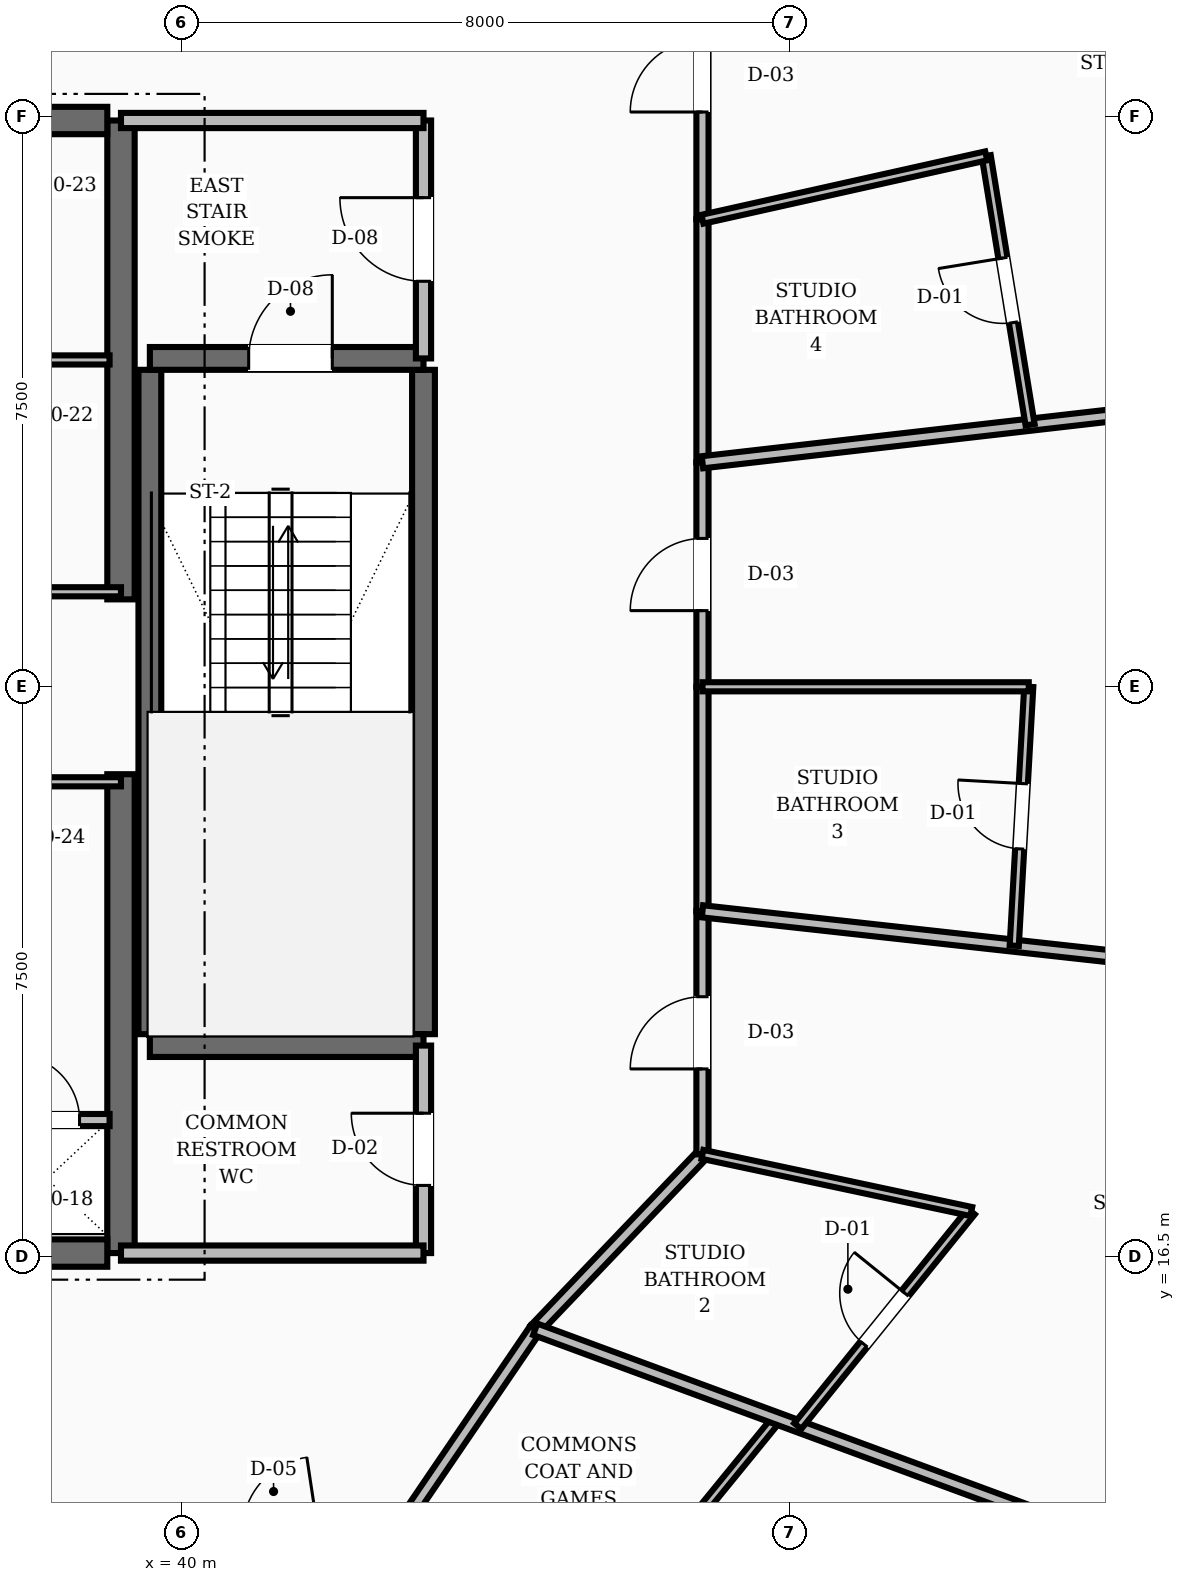
"""IFC4 building model, lengths in metres.
Left out: names, types, materials, properties, quantities, classifications, styles, units other than length and angle.
Written with IfcOpenShell. Run it as: python <this file> out.ifc"""

import sys

from ifc_helpers import new_model, si_unit, direction, frame, frame_2d, origin, place, context, subcontext, project, spatial, rectangle, extrude, element, fill, save


model = new_model("IFC4")
c1 = context("Model", 3, precision=1e-05, world=origin(), true_north=direction((0.0, 1.0)))
c2 = subcontext(c1, "Body", "Model", "MODEL_VIEW")
j1 = project(units=[si_unit("LENGTHUNIT", "METRE"), si_unit("PLANEANGLEUNIT", "RADIAN")], contexts=[c1])
p1 = place(None, origin())
s1 = spatial("IfcSite", under=j1, at=p1, CompositionType="ELEMENT")
p2 = place(p1, origin())
s2 = spatial("IfcBuilding", under=s1, at=p2, CompositionType="ELEMENT")
p3 = place(p2, frame((0.0, 0.0, 120.8)))
s3 = spatial("IfcBuildingStorey", under=s2, at=p3, CompositionType="ELEMENT", Elevation=120.8)
for number, where, z_axis, x_axis in (
    (1, (39.2, 16.55, 0.0), (0.0, 0.0, 1.0), (0.0, 1.0, 0.0)),
    (2, (39.2, 25.15, 0.0), (0.0, 0.0, 1.0), (0.0, 1.0, 0.0)),
):
    element("IfcWall", number, at=place(p3, frame(where, z_axis=z_axis, x_axis=x_axis)), inside=s3, PredefinedType="SHEAR", context=c2, shape_type="SweptSolid", body=[
        extrude(rectangle(XDim=6.3, YDim=0.36, at=frame_2d((3.15, 0.0))), origin(), (0.0, 0.0, 1.0), 3.6),
    ])
p4 = place(p3, frame((35.8, 16.55, 0.0), z_axis=(0.0, 0.0, 1.0), x_axis=(1.0, 0.0, 0.0)))
e3 = element("IfcWall", 3, at=p4, inside=s3, PredefinedType="SHEAR", context=c2, shape_type="SweptSolid", body=[
    extrude(rectangle(XDim=3.22, YDim=0.36, at=frame_2d((1.61, 0.0))), origin(), (0.0, 0.0, 1.0), 3.6),
])
p5 = place(p4, frame((0.3, 0.0, 0.0)))
e4 = element("IfcOpeningElement", 4, at=p5, cuts=e3, PredefinedType="OPENING", context=c2, shape_type="SweptSolid", body=[
    extrude(rectangle(XDim=1.1, YDim=2.1, at=frame_2d((0.55, 1.05))), frame((0.0, 0.19, 0.0), z_axis=(0.0, -1.0, 0.0), x_axis=(1.0, 0.0, 0.0)), (0.0, 0.0, 1.0), 0.38),
])
p6 = place(p3, frame((35.8, 31.45, 0.0), z_axis=(0.0, 0.0, 1.0), x_axis=(1.0, 0.0, 0.0)))
e5 = element("IfcWall", 5, at=p6, inside=s3, PredefinedType="SHEAR", context=c2, shape_type="SweptSolid", body=[
    extrude(rectangle(XDim=3.22, YDim=0.36, at=frame_2d((1.61, 0.0))), origin(), (0.0, 0.0, 1.0), 3.6),
])
p7 = place(p6, frame((0.3, 0.0, 0.0)))
e6 = element("IfcOpeningElement", 6, at=p7, cuts=e5, PredefinedType="OPENING", context=c2, shape_type="SweptSolid", body=[
    extrude(rectangle(XDim=1.1, YDim=2.1, at=frame_2d((0.55, 1.05))), frame((0.0, 0.19, 0.0), z_axis=(0.0, -1.0, 0.0), x_axis=(1.0, 0.0, 0.0)), (0.0, 0.0, 1.0), 0.38),
])
for number, where, z_axis, x_axis in (
    (7, (43.18, 19.43, 0.0), (0.0, 0.0, 1.0), (0.0, 1.0, 0.0)),
    (8, (39.58, 19.43, 0.0), (0.0, 0.0, 1.0), (0.0, 1.0, 0.0)),
):
    element("IfcWall", number, at=place(p3, frame(where, z_axis=z_axis, x_axis=x_axis)), inside=s3, PredefinedType="SHEAR", context=c2, shape_type="SweptSolid", body=[
        extrude(rectangle(XDim=8.74, YDim=0.3, at=frame_2d((4.37, 0.0))), origin(), (0.0, 0.0, 1.0), 3.6),
    ])
p8 = place(p3, frame((39.58, 19.28, 0.0), z_axis=(0.0, 0.0, 1.0), x_axis=(1.0, 0.0, 0.0)))
e9 = element("IfcWall", 9, at=p8, inside=s3, PredefinedType="SHEAR", context=c2, shape_type="SweptSolid", body=[
    extrude(rectangle(XDim=3.6, YDim=0.3, at=frame_2d((1.8, 0.0))), origin(), (0.0, 0.0, 1.0), 3.6),
])
p9 = place(p3, frame((39.58, 28.32, 0.0), z_axis=(0.0, 0.0, 1.0), x_axis=(1.0, 0.0, 0.0)))
e10 = element("IfcWall", 10, at=p9, inside=s3, PredefinedType="SHEAR", context=c2, shape_type="SweptSolid", body=[
    extrude(rectangle(XDim=3.6, YDim=0.3, at=frame_2d((1.8, 0.0))), origin(), (0.0, 0.0, 1.0), 3.6),
])
p10 = place(p9, frame((1.3, 0.0, 0.0)))
e11 = element("IfcOpeningElement", 11, at=p10, cuts=e10, PredefinedType="OPENING", context=c2, shape_type="SweptSolid", body=[
    extrude(rectangle(XDim=1.1, YDim=2.1, at=frame_2d((0.55, 1.05))), frame((0.0, 0.16, 0.0), z_axis=(0.0, -1.0, 0.0), x_axis=(1.0, 0.0, 0.0)), (0.0, 0.0, 1.0), 0.32),
])
p11 = place(p3, frame((43.18, 28.32, 0.0), z_axis=(0.0, 0.0, 1.0), x_axis=(0.0, 1.0, 0.0)))
e12 = element("IfcWall", 12, at=p11, inside=s3, PredefinedType="SOLIDWALL", context=c2, shape_type="SweptSolid", body=[
    extrude(rectangle(XDim=3.13, YDim=0.2, at=frame_2d((1.565, 0.0))), origin(), (0.0, 0.0, 1.0), 2.8),
])
p12 = place(p11, frame((1.015, 0.0, 0.0)))
e13 = element("IfcOpeningElement", 13, at=p12, cuts=e12, PredefinedType="OPENING", context=c2, shape_type="SweptSolid", body=[
    extrude(rectangle(XDim=1.1, YDim=2.1, at=frame_2d((0.55, 1.05))), frame((0.0, 0.11, 0.0), z_axis=(0.0, -1.0, 0.0), x_axis=(1.0, 0.0, 0.0)), (0.0, 0.0, 1.0), 0.22),
])
p13 = place(p3, frame((39.2, 31.45, 0.0), z_axis=(0.0, 0.0, 1.0), x_axis=(1.0, 0.0, 0.0)))
e14 = element("IfcWall", 14, at=p13, inside=s3, PredefinedType="SOLIDWALL", context=c2, shape_type="SweptSolid", body=[
    extrude(rectangle(XDim=3.98, YDim=0.2, at=frame_2d((1.99, 0.0))), origin(), (0.0, 0.0, 1.0), 2.8),
])
p14 = place(p3, frame((43.18, 16.55, 0.0), z_axis=(0.0, 0.0, 1.0), x_axis=(0.0, 1.0, 0.0)))
e15 = element("IfcWall", 15, at=p14, inside=s3, PredefinedType="SOLIDWALL", context=c2, shape_type="SweptSolid", body=[
    extrude(rectangle(XDim=2.73, YDim=0.2, at=frame_2d((1.365, 0.0))), origin(), (0.0, 0.0, 1.0), 2.8),
])
p15 = place(p14, frame((0.89, 0.0, 0.0)))
e16 = element("IfcOpeningElement", 16, at=p15, cuts=e15, PredefinedType="OPENING", context=c2, shape_type="SweptSolid", body=[
    extrude(rectangle(XDim=0.95, YDim=2.1, at=frame_2d((0.475, 1.05))), frame((0.0, 0.11, 0.0), z_axis=(0.0, -1.0, 0.0), x_axis=(1.0, 0.0, 0.0)), (0.0, 0.0, 1.0), 0.22),
])
p16 = place(p3, frame((39.2, 16.55, 0.0), z_axis=(0.0, 0.0, 1.0), x_axis=(1.0, 0.0, 0.0)))
e17 = element("IfcWall", 17, at=p16, inside=s3, PredefinedType="SOLIDWALL", context=c2, shape_type="SweptSolid", body=[
    extrude(rectangle(XDim=3.98, YDim=0.2, at=frame_2d((1.99, 0.0))), origin(), (0.0, 0.0, 1.0), 2.8),
])
p17 = place(p3, frame((37.4, 18.3, 0.0), z_axis=(0.0, 0.0, 1.0), x_axis=(1.0, 0.0, 0.0)))
e18 = element("IfcWall", 18, at=p17, inside=s3, PredefinedType="SOLIDWALL", context=c2, shape_type="SweptSolid", body=[
    extrude(rectangle(XDim=1.65, YDim=0.16, at=frame_2d((0.825, 0.0))), origin(), (0.0, 0.0, 1.0), 2.8),
])
p18 = place(p17, frame((0.395, 0.0, 0.0)))
e19 = element("IfcOpeningElement", 19, at=p18, cuts=e18, PredefinedType="OPENING", context=c2, shape_type="SweptSolid", body=[
    extrude(rectangle(XDim=0.86, YDim=2.1, at=frame_2d((0.43, 1.05))), frame((0.0, 0.09, 0.0), z_axis=(0.0, -1.0, 0.0), x_axis=(1.0, 0.0, 0.0)), (0.0, 0.0, 1.0), 0.18),
])
for number, where, z_axis, x_axis in (
    (20, (37.4, 25.25, 0.0), (0.0, 0.0, 1.0), (1.0, 0.0, 0.0)),
    (21, (37.4, 22.75, 0.0), (0.0, 0.0, 1.0), (1.0, 0.0, 0.0)),
):
    element("IfcWall", number, at=place(p3, frame(where, z_axis=z_axis, x_axis=x_axis)), inside=s3, PredefinedType="PARTITIONING", context=c2, shape_type="SweptSolid", body=[
        extrude(rectangle(XDim=1.8, YDim=0.12, at=frame_2d((0.9, 0.0))), origin(), (0.0, 0.0, 1.0), 2.8),
    ])
p19 = place(p3, frame((37.4, 28.3, 0.0), z_axis=(0.0, 0.0, 1.0), x_axis=(1.0, 0.0, 0.0)))
e22 = element("IfcWall", 22, at=p19, inside=s3, PredefinedType="PARTITIONING", context=c2, shape_type="SweptSolid", body=[
    extrude(rectangle(XDim=1.65, YDim=0.12, at=frame_2d((0.825, 0.0))), origin(), (0.0, 0.0, 1.0), 2.8),
])
p20 = place(p3, frame((46.85, 24.0, 0.0), z_axis=(0.0, 0.0, 1.0), x_axis=(0.0, 1.0, 0.0)))
e23 = element("IfcWall", 23, at=p20, inside=s3, PredefinedType="SOLIDWALL", context=c2, shape_type="SweptSolid", body=[
    extrude(rectangle(XDim=2.954, YDim=0.16, at=frame_2d((1.477, 0.0))), origin(), (0.0, 0.0, 1.0), 2.8),
])
p21 = place(p20, frame((1.002, 0.0, 0.0)))
e24 = element("IfcOpeningElement", 24, at=p21, cuts=e23, PredefinedType="OPENING", context=c2, shape_type="SweptSolid", body=[
    extrude(rectangle(XDim=0.95, YDim=2.1, at=frame_2d((0.475, 1.05))), frame((0.0, 0.09, 0.0), z_axis=(0.0, -1.0, 0.0), x_axis=(1.0, 0.0, 0.0)), (0.0, 0.0, 1.0), 0.18),
])
p22 = place(p3, frame((46.85, 26.954, 0.0), z_axis=(0.0, 0.0, 1.0), x_axis=(0.0, 1.0, 0.0)))
e25 = element("IfcWall", 25, at=p22, inside=s3, PredefinedType="SOLIDWALL", context=c2, shape_type="SweptSolid", body=[
    extrude(rectangle(XDim=3.197, YDim=0.16, at=frame_2d((1.599, 0.0))), origin(), (0.0, 0.0, 1.0), 2.8),
])
p23 = place(p3, frame((46.85, 30.151, 0.0), z_axis=(0.0, 0.0, 1.0), x_axis=(0.0, 1.0, 0.0)))
e26 = element("IfcWall", 26, at=p23, inside=s3, PredefinedType="SOLIDWALL", context=c2, shape_type="SweptSolid", body=[
    extrude(rectangle(XDim=3.771, YDim=0.16, at=frame_2d((1.886, 0.0))), origin(), (0.0, 0.0, 1.0), 2.8),
])
p24 = place(p23, frame((1.411, 0.0, 0.0)))
e27 = element("IfcOpeningElement", 27, at=p24, cuts=e26, PredefinedType="OPENING", context=c2, shape_type="SweptSolid", body=[
    extrude(rectangle(XDim=0.95, YDim=2.1, at=frame_2d((0.475, 1.05))), frame((0.0, 0.09, 0.0), z_axis=(0.0, -1.0, 0.0), x_axis=(1.0, 0.0, 0.0)), (0.0, 0.0, 1.0), 0.18),
])
p25 = place(p3, frame((42.95, 13.05, 0.0), z_axis=(0.0, 0.0, 1.0), x_axis=(0.562674669208, 0.826678423955, 0.0)))
e28 = element("IfcWall", 28, at=p25, inside=s3, PredefinedType="SOLIDWALL", context=c2, shape_type="SweptSolid", body=[
    extrude(rectangle(XDim=3.021, YDim=0.16, at=frame_2d((1.511, 0.0))), origin(), (0.0, 0.0, 1.0), 2.8),
])
p26 = place(p3, frame((44.65, 15.548, 0.0), z_axis=(0.0, 0.0, 1.0), x_axis=(0.691055487108, 0.722801711216, 0.0)))
e29 = element("IfcWall", 29, at=p26, inside=s3, PredefinedType="SOLIDWALL", context=c2, shape_type="SweptSolid", body=[
    extrude(rectangle(XDim=3.184, YDim=0.16, at=frame_2d((1.592, 0.0))), origin(), (0.0, 0.0, 1.0), 2.8),
])
p27 = place(p3, frame((46.85, 17.849, 0.0), z_axis=(0.0, 0.0, 1.0), x_axis=(0.0, 1.0, 0.0)))
e30 = element("IfcWall", 30, at=p27, inside=s3, PredefinedType="SOLIDWALL", context=c2, shape_type="SweptSolid", body=[
    extrude(rectangle(XDim=3.197, YDim=0.16, at=frame_2d((1.599, 0.0))), origin(), (0.0, 0.0, 1.0), 2.8),
])
p28 = place(p27, frame((1.124, 0.0, 0.0)))
e31 = element("IfcOpeningElement", 31, at=p28, cuts=e30, PredefinedType="OPENING", context=c2, shape_type="SweptSolid", body=[
    extrude(rectangle(XDim=0.95, YDim=2.1, at=frame_2d((0.475, 1.05))), frame((0.0, 0.09, 0.0), z_axis=(0.0, -1.0, 0.0), x_axis=(1.0, 0.0, 0.0)), (0.0, 0.0, 1.0), 0.18),
])
p29 = place(p3, frame((46.85, 21.046, 0.0), z_axis=(0.0, 0.0, 1.0), x_axis=(0.0, 1.0, 0.0)))
e32 = element("IfcWall", 32, at=p29, inside=s3, PredefinedType="SOLIDWALL", context=c2, shape_type="SweptSolid", body=[
    extrude(rectangle(XDim=2.954, YDim=0.16, at=frame_2d((1.477, 0.0))), origin(), (0.0, 0.0, 1.0), 2.8),
])
p30 = place(p3, frame((45.588, 11.624, 0.0), z_axis=(0.0, 0.0, 1.0), x_axis=(0.632049552825, 0.774927972636, 0.0)))
e33 = element("IfcWall", 33, at=p30, inside=s3, PredefinedType="PARTITIONING", context=c2, shape_type="SweptSolid", body=[
    extrude(rectangle(XDim=3.549, YDim=0.12, at=frame_2d((1.774, 0.0))), origin(), (0.0, 0.0, 1.0), 2.8),
])
p31 = place(p3, frame((44.65, 15.548, 0.0), z_axis=(0.0, 0.0, 1.0), x_axis=(0.938256165997, -0.345941276764, 0.0)))
e34 = element("IfcWall", 34, at=p31, inside=s3, PredefinedType="SOLIDWALL", context=c2, shape_type="SweptSolid", body=[
    extrude(rectangle(XDim=9.639, YDim=0.16, at=frame_2d((4.819, 0.0))), origin(), (0.0, 0.0, 1.0), 2.8),
])
p32 = place(p3, frame((48.104, 14.274, 0.0), z_axis=(0.0, 0.0, 1.0), x_axis=(0.628681475745, 0.777662910299, 0.0)))
e35 = element("IfcWall", 35, at=p32, inside=s3, PredefinedType="PARTITIONING", context=c2, shape_type="SweptSolid", body=[
    extrude(rectangle(XDim=3.63, YDim=0.12, at=frame_2d((1.815, 0.0))), origin(), (0.0, 0.0, 1.0), 2.8),
])
p33 = place(p32, frame((1.385, 0.0, 0.0)))
e36 = element("IfcOpeningElement", 36, at=p33, cuts=e35, PredefinedType="OPENING", context=c2, shape_type="SweptSolid", body=[
    extrude(rectangle(XDim=0.86, YDim=2.1, at=frame_2d((0.43, 1.05))), frame((0.0, 0.07, 0.0), z_axis=(0.0, -1.0, 0.0), x_axis=(1.0, 0.0, 0.0)), (0.0, 0.0, 1.0), 0.14),
])
p34 = place(p3, frame((46.85, 17.849, 0.0), z_axis=(0.0, 0.0, 1.0), x_axis=(0.978118502474, -0.208048540292, 0.0)))
e37 = element("IfcWall", 37, at=p34, inside=s3, PredefinedType="PARTITIONING", context=c2, shape_type="SweptSolid", body=[
    extrude(rectangle(XDim=3.615, YDim=0.12, at=frame_2d((1.808, 0.0))), origin(), (0.0, 0.0, 1.0), 2.8),
])
p35 = place(p3, frame((46.85, 21.046, 0.0), z_axis=(0.0, 0.0, 1.0), x_axis=(0.993965535476, -0.109692817837, 0.0)))
e38 = element("IfcWall", 38, at=p35, inside=s3, PredefinedType="SOLIDWALL", context=c2, shape_type="SweptSolid", body=[
    extrude(rectangle(XDim=10.81, YDim=0.16, at=frame_2d((5.405, 0.0))), origin(), (0.0, 0.0, 1.0), 2.8),
])
p36 = place(p3, frame((50.952, 20.594, 0.0), z_axis=(0.0, 0.0, 1.0), x_axis=(0.055957480499, 0.998433152683, 0.0)))
e39 = element("IfcWall", 39, at=p36, inside=s3, PredefinedType="PARTITIONING", context=c2, shape_type="SweptSolid", body=[
    extrude(rectangle(XDim=3.412, YDim=0.12, at=frame_2d((1.706, 0.0))), origin(), (0.0, 0.0, 1.0), 2.8),
])
p37 = place(p36, frame((1.276, 0.0, 0.0)))
e40 = element("IfcOpeningElement", 40, at=p37, cuts=e39, PredefinedType="OPENING", context=c2, shape_type="SweptSolid", body=[
    extrude(rectangle(XDim=0.86, YDim=2.1, at=frame_2d((0.43, 1.05))), frame((0.0, 0.07, 0.0), z_axis=(0.0, -1.0, 0.0), x_axis=(1.0, 0.0, 0.0)), (0.0, 0.0, 1.0), 0.14),
])
p38 = place(p3, frame((46.85, 24.0, 0.0), z_axis=(0.0, 0.0, 1.0), x_axis=(1.0, 0.0, 0.0)))
e41 = element("IfcWall", 41, at=p38, inside=s3, PredefinedType="PARTITIONING", context=c2, shape_type="SweptSolid", body=[
    extrude(rectangle(XDim=4.293, YDim=0.12, at=frame_2d((2.146, 0.0))), origin(), (0.0, 0.0, 1.0), 2.8),
])
p39 = place(p3, frame((46.85, 26.954, 0.0), z_axis=(0.0, 0.0, 1.0), x_axis=(0.993493502976, 0.113888803422, 0.0)))
e42 = element("IfcWall", 42, at=p39, inside=s3, PredefinedType="SOLIDWALL", context=c2, shape_type="SweptSolid", body=[
    extrude(rectangle(XDim=11.368, YDim=0.16, at=frame_2d((5.684, 0.0))), origin(), (0.0, 0.0, 1.0), 2.8),
])
p40 = place(p3, frame((51.161, 27.448, 0.0), z_axis=(0.0, 0.0, 1.0), x_axis=(-0.161117002458, 0.986935312733, 0.0)))
e43 = element("IfcWall", 43, at=p40, inside=s3, PredefinedType="PARTITIONING", context=c2, shape_type="SweptSolid", body=[
    extrude(rectangle(XDim=3.584, YDim=0.12, at=frame_2d((1.792, 0.0))), origin(), (0.0, 0.0, 1.0), 2.8),
])
p41 = place(p40, frame((1.362, 0.0, 0.0)))
e44 = element("IfcOpeningElement", 44, at=p41, cuts=e43, PredefinedType="OPENING", context=c2, shape_type="SweptSolid", body=[
    extrude(rectangle(XDim=0.86, YDim=2.1, at=frame_2d((0.43, 1.05))), frame((0.0, 0.07, 0.0), z_axis=(0.0, -1.0, 0.0), x_axis=(1.0, 0.0, 0.0)), (0.0, 0.0, 1.0), 0.14),
])
p42 = place(p3, frame((46.85, 30.151, 0.0), z_axis=(0.0, 0.0, 1.0), x_axis=(0.975956740553, 0.217964310312, 0.0)))
e45 = element("IfcWall", 45, at=p42, inside=s3, PredefinedType="PARTITIONING", context=c2, shape_type="SweptSolid", body=[
    extrude(rectangle(XDim=3.825, YDim=0.12, at=frame_2d((1.913, 0.0))), origin(), (0.0, 0.0, 1.0), 2.8),
])
p43 = place(p10, origin())
e46 = element("IfcDoor", 46, at=p43, inside=s3, OperationType="SINGLE_SWING_RIGHT", PredefinedType="DOOR", context=c2, shape_type="SweptSolid", body=[
    extrude(rectangle(XDim=1.1, YDim=2.1, at=frame_2d((0.55, 1.05))), frame((0.0, 0.025, 0.0), z_axis=(0.0, -1.0, 0.0), x_axis=(1.0, 0.0, 0.0)), (0.0, 0.0, 1.0), 0.05),
])
fill(e11, e46)
p44 = place(p12, origin())
e47 = element("IfcDoor", 47, at=p44, inside=s3, OperationType="SINGLE_SWING_RIGHT", PredefinedType="DOOR", context=c2, shape_type="SweptSolid", body=[
    extrude(rectangle(XDim=1.1, YDim=2.1, at=frame_2d((0.55, 1.05))), frame((0.0, 0.025, 0.0), z_axis=(0.0, -1.0, 0.0), x_axis=(1.0, 0.0, 0.0)), (0.0, 0.0, 1.0), 0.05),
])
fill(e13, e47)
p45 = place(p15, origin())
e48 = element("IfcDoor", 48, at=p45, inside=s3, OperationType="SINGLE_SWING_RIGHT", PredefinedType="DOOR", context=c2, shape_type="SweptSolid", body=[
    extrude(rectangle(XDim=0.95, YDim=2.1, at=frame_2d((0.475, 1.05))), frame((0.0, 0.025, 0.0), z_axis=(0.0, -1.0, 0.0), x_axis=(1.0, 0.0, 0.0)), (0.0, 0.0, 1.0), 0.05),
])
fill(e16, e48)
p46 = place(p18, origin())
e49 = element("IfcDoor", 49, at=p46, inside=s3, OperationType="SINGLE_SWING_LEFT", PredefinedType="TRAPDOOR", context=c2, shape_type="SweptSolid", body=[
    extrude(rectangle(XDim=0.86, YDim=2.1, at=frame_2d((0.43, 1.05))), frame((0.0, 0.025, 0.0), z_axis=(0.0, -1.0, 0.0), x_axis=(1.0, 0.0, 0.0)), (0.0, 0.0, 1.0), 0.05),
])
fill(e19, e49)
p47 = place(p33, origin())
e50 = element("IfcDoor", 50, at=p47, inside=s3, OperationType="SINGLE_SWING_RIGHT", PredefinedType="DOOR", context=c2, shape_type="SweptSolid", body=[
    extrude(rectangle(XDim=0.86, YDim=2.1, at=frame_2d((0.43, 1.05))), frame((0.0, 0.025, 0.0), z_axis=(0.0, -1.0, 0.0), x_axis=(1.0, 0.0, 0.0)), (0.0, 0.0, 1.0), 0.05),
])
fill(e36, e50)
p48 = place(p28, origin())
e51 = element("IfcDoor", 51, at=p48, inside=s3, OperationType="SINGLE_SWING_LEFT", PredefinedType="DOOR", context=c2, shape_type="SweptSolid", body=[
    extrude(rectangle(XDim=0.95, YDim=2.1, at=frame_2d((0.475, 1.05))), frame((0.0, 0.025, 0.0), z_axis=(0.0, -1.0, 0.0), x_axis=(1.0, 0.0, 0.0)), (0.0, 0.0, 1.0), 0.05),
])
fill(e31, e51)
p49 = place(p37, origin())
e52 = element("IfcDoor", 52, at=p49, inside=s3, OperationType="SINGLE_SWING_RIGHT", PredefinedType="DOOR", context=c2, shape_type="SweptSolid", body=[
    extrude(rectangle(XDim=0.86, YDim=2.1, at=frame_2d((0.43, 1.05))), frame((0.0, 0.025, 0.0), z_axis=(0.0, -1.0, 0.0), x_axis=(1.0, 0.0, 0.0)), (0.0, 0.0, 1.0), 0.05),
])
fill(e40, e52)
p50 = place(p21, origin())
e53 = element("IfcDoor", 53, at=p50, inside=s3, OperationType="SINGLE_SWING_LEFT", PredefinedType="DOOR", context=c2, shape_type="SweptSolid", body=[
    extrude(rectangle(XDim=0.95, YDim=2.1, at=frame_2d((0.475, 1.05))), frame((0.0, 0.025, 0.0), z_axis=(0.0, -1.0, 0.0), x_axis=(1.0, 0.0, 0.0)), (0.0, 0.0, 1.0), 0.05),
])
fill(e24, e53)
p51 = place(p41, origin())
e54 = element("IfcDoor", 54, at=p51, inside=s3, OperationType="SINGLE_SWING_RIGHT", PredefinedType="DOOR", context=c2, shape_type="SweptSolid", body=[
    extrude(rectangle(XDim=0.86, YDim=2.1, at=frame_2d((0.43, 1.05))), frame((0.0, 0.025, 0.0), z_axis=(0.0, -1.0, 0.0), x_axis=(1.0, 0.0, 0.0)), (0.0, 0.0, 1.0), 0.05),
])
fill(e44, e54)
p52 = place(p24, origin())
e55 = element("IfcDoor", 55, at=p52, inside=s3, OperationType="SINGLE_SWING_LEFT", PredefinedType="DOOR", context=c2, shape_type="SweptSolid", body=[
    extrude(rectangle(XDim=0.95, YDim=2.1, at=frame_2d((0.475, 1.05))), frame((0.0, 0.025, 0.0), z_axis=(0.0, -1.0, 0.0), x_axis=(1.0, 0.0, 0.0)), (0.0, 0.0, 1.0), 0.05),
])
fill(e27, e55)
save(model, sys.argv[1])
